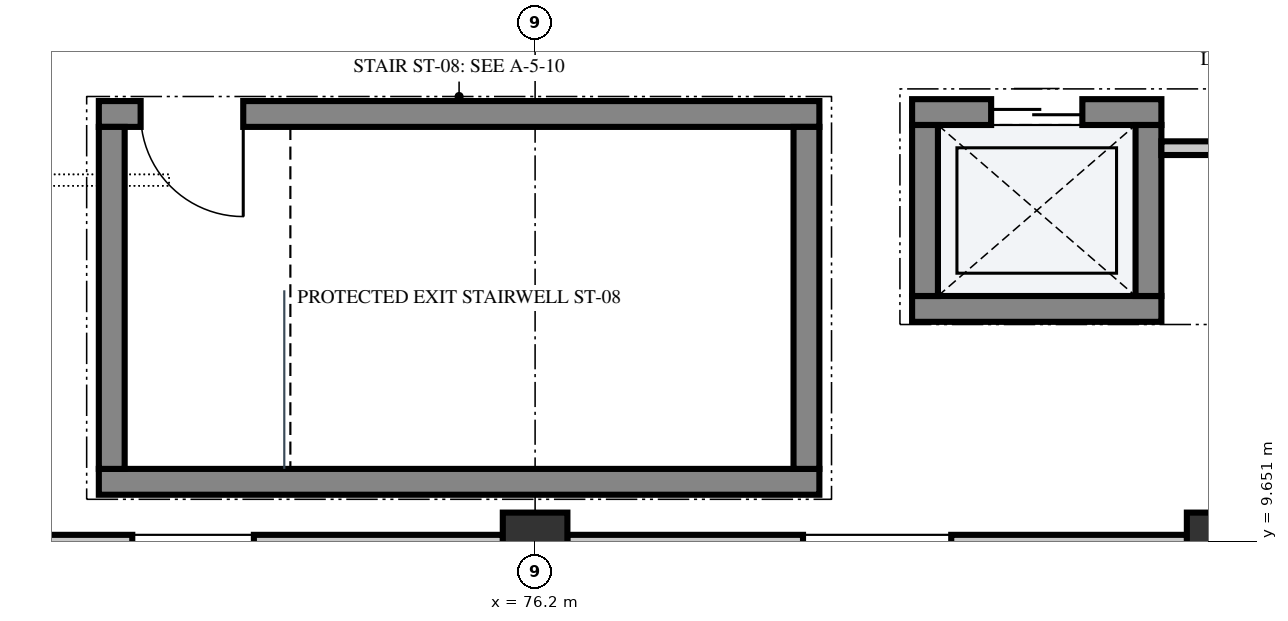
"""IFC4 building model, lengths in metres.
Left out: names, types, materials, properties, quantities, classifications, styles, units other than length and angle.
Written with IfcOpenShell. Run it as: python <this file> out.ifc"""

import sys

from ifc_helpers import new_model, si_unit, direction, frame, frame_2d, origin, origin_2d, place, context, subcontext, project, spatial, rectangle, extrude, element, fill, save


model = new_model("IFC4")
c1 = context("Model", 3, precision=1e-05, world=origin(), true_north=direction((0.0, 1.0)))
c2 = subcontext(c1, "Body", "Model", "MODEL_VIEW")
j1 = project(units=[si_unit("LENGTHUNIT", "METRE"), si_unit("PLANEANGLEUNIT", "RADIAN")], contexts=[c1])
p1 = place(None, origin())
s1 = spatial("IfcSite", under=j1, at=p1, CompositionType="ELEMENT")
p2 = place(p1, origin())
s2 = spatial("IfcBuilding", under=s1, at=p2, CompositionType="ELEMENT")
p3 = place(p2, frame((0.0, 0.0, 15.0)))
s3 = spatial("IfcBuildingStorey", under=s2, at=p3, CompositionType="ELEMENT", Elevation=15.0)
for number, where, z_axis, x_axis in (
    (1, (85.2, 9.6, 0.0), (0.0, 0.0, 1.0), (1.0, 0.0, 0.0)),
    (2, (76.2, 9.6, 0.0), (0.0, 0.0, 1.0), (1.0, 0.0, 0.0)),
):
    element("IfcColumn", number, at=place(p3, frame(where, z_axis=z_axis, x_axis=x_axis)), inside=s3, PredefinedType="COLUMN", context=c2, shape_type="SweptSolid", body=[
        extrude(rectangle(XDim=0.85, YDim=0.85, at=origin_2d()), origin(), (0.0, 0.0, 1.0), 4.8),
    ])
p4 = place(p3, frame((84.777, 9.6, 0.0), z_axis=(0.0, 0.0, 1.0), x_axis=(-1.0, 0.0, 0.0)))
e3 = element("IfcWall", 3, at=p4, inside=s3, PredefinedType="SOLIDWALL", context=c2, shape_type="SweptSolid", body=[
    extrude(rectangle(XDim=8.154, YDim=0.265, at=frame_2d((4.077, 0.0))), origin(), (0.0, 0.0, 1.0), 3.49),
])
p5 = place(p4, frame((3.102, 0.0, 1.1)))
e4 = element("IfcOpeningElement", 4, at=p5, cuts=e3, PredefinedType="OPENING", context=c2, shape_type="SweptSolid", body=[
    extrude(rectangle(XDim=1.95, YDim=1.75, at=frame_2d((0.975, 0.875))), frame((0.0, 0.145, 0.0), z_axis=(0.0, -1.0, 0.0), x_axis=(1.0, 0.0, 0.0)), (0.0, 0.0, 1.0), 0.289),
])
p6 = place(p3, frame((75.777, 9.6, 0.0), z_axis=(0.0, 0.0, 1.0), x_axis=(-1.0, 0.0, 0.0)))
e5 = element("IfcWall", 5, at=p6, inside=s3, PredefinedType="SOLIDWALL", context=c2, shape_type="SweptSolid", body=[
    extrude(rectangle(XDim=8.154, YDim=0.265, at=frame_2d((4.077, 0.0))), origin(), (0.0, 0.0, 1.0), 3.49),
])
p7 = place(p6, frame((3.277, 0.0, 1.1)))
e6 = element("IfcOpeningElement", 6, at=p7, cuts=e5, PredefinedType="OPENING", context=c2, shape_type="SweptSolid", body=[
    extrude(rectangle(XDim=1.6, YDim=1.7, at=frame_2d((0.8, 0.85))), frame((0.0, 0.145, 0.0), z_axis=(0.0, -1.0, 0.0), x_axis=(1.0, 0.0, 0.0)), (0.0, 0.0, 1.0), 0.289),
])
p8 = place(p3, frame((70.46, 10.43, 0.0), z_axis=(0.0, 0.0, 1.0), x_axis=(1.0, 0.0, 0.0)))
e7 = element("IfcWall", 7, at=p8, inside=s3, PredefinedType="SHEAR", context=c2, shape_type="SweptSolid", body=[
    extrude(rectangle(XDim=9.48, YDim=0.34, at=frame_2d((4.74, 0.0))), origin(), (0.0, 0.0, 1.0), 4.52),
])
p9 = place(p3, frame((70.46, 15.27, 0.0), z_axis=(0.0, 0.0, 1.0), x_axis=(1.0, 0.0, 0.0)))
e8 = element("IfcWall", 8, at=p9, inside=s3, PredefinedType="SHEAR", context=c2, shape_type="SweptSolid", body=[
    extrude(rectangle(XDim=9.48, YDim=0.34, at=frame_2d((4.74, 0.0))), origin(), (0.0, 0.0, 1.0), 4.52),
])
p10 = place(p9, frame((0.55, 0.0, 0.0)))
e9 = element("IfcOpeningElement", 9, at=p10, cuts=e8, PredefinedType="OPENING", context=c2, shape_type="SweptSolid", body=[
    extrude(rectangle(XDim=1.35, YDim=2.2, at=frame_2d((0.675, 1.1))), frame((0.0, 0.182, 0.0), z_axis=(0.0, -1.0, 0.0), x_axis=(1.0, 0.0, 0.0)), (0.0, 0.0, 1.0), 0.364),
])
for number, where, z_axis, x_axis in (
    (10, (79.77, 10.6, 0.0), (0.0, 0.0, 1.0), (0.0, 1.0, 0.0)),
    (11, (70.63, 10.6, 0.0), (0.0, 0.0, 1.0), (0.0, 1.0, 0.0)),
):
    element("IfcWall", number, at=place(p3, frame(where, z_axis=z_axis, x_axis=x_axis)), inside=s3, PredefinedType="SHEAR", context=c2, shape_type="SweptSolid", body=[
        extrude(rectangle(XDim=4.5, YDim=0.34, at=frame_2d((2.25, 0.0))), origin(), (0.0, 0.0, 1.0), 4.52),
    ])
p11 = place(p3, frame((81.16, 12.705, 0.0), z_axis=(0.0, 0.0, 1.0), x_axis=(1.0, 0.0, 0.0)))
e12 = element("IfcWall", 12, at=p11, inside=s3, PredefinedType="SHEAR", context=c2, shape_type="SweptSolid", body=[
    extrude(rectangle(XDim=3.28, YDim=0.34, at=frame_2d((1.64, 0.0))), origin(), (0.0, 0.0, 1.0), 4.52),
])
p12 = place(p3, frame((81.16, 15.295, 0.0), z_axis=(0.0, 0.0, 1.0), x_axis=(1.0, 0.0, 0.0)))
e13 = element("IfcWall", 13, at=p12, inside=s3, PredefinedType="SHEAR", context=c2, shape_type="SweptSolid", body=[
    extrude(rectangle(XDim=3.28, YDim=0.34, at=frame_2d((1.64, 0.0))), origin(), (0.0, 0.0, 1.0), 4.52),
])
p13 = place(p12, frame((1.04, 0.0, 0.0)))
e14 = element("IfcOpeningElement", 14, at=p13, cuts=e13, PredefinedType="OPENING", context=c2, shape_type="SweptSolid", body=[
    extrude(rectangle(XDim=1.2, YDim=2.2, at=frame_2d((0.6, 1.1))), frame((0.0, 0.182, 0.0), z_axis=(0.0, -1.0, 0.0), x_axis=(1.0, 0.0, 0.0)), (0.0, 0.0, 1.0), 0.364),
])
for number, where, z_axis, x_axis in (
    (15, (81.33, 12.875, 0.0), (0.0, 0.0, 1.0), (0.0, 1.0, 0.0)),
    (16, (84.27, 12.875, 0.0), (0.0, 0.0, 1.0), (0.0, 1.0, 0.0)),
):
    element("IfcWall", number, at=place(p3, frame(where, z_axis=z_axis, x_axis=x_axis)), inside=s3, PredefinedType="SHEAR", context=c2, shape_type="SweptSolid", body=[
        extrude(rectangle(XDim=2.25, YDim=0.34, at=frame_2d((1.125, 0.0))), origin(), (0.0, 0.0, 1.0), 4.52),
    ])
p14 = place(p3, frame((84.44, 14.82, 0.0), z_axis=(0.0, 0.0, 1.0), x_axis=(1.0, 0.0, 0.0)))
e17 = element("IfcWall", 17, at=p14, inside=s3, PredefinedType="PARTITIONING", context=c2, shape_type="SweptSolid", body=[
    extrude(rectangle(XDim=4.12, YDim=0.18, at=frame_2d((2.06, 0.0))), origin(), (0.0, 0.0, 1.0), 4.52),
])
p15 = place(p10, frame((1.35, 0.0, 0.0), z_axis=(0.0, 0.0, 1.0), x_axis=(-1.0, 0.0, 0.0)))
e18 = element("IfcDoor", 18, at=p15, inside=s3, OperationType="SINGLE_SWING_LEFT", PredefinedType="DOOR", context=c2, shape_type="SweptSolid", body=[
    extrude(rectangle(XDim=1.35, YDim=2.2, at=frame_2d((0.675, 1.1))), frame((0.0, 0.025, 0.0), z_axis=(0.0, -1.0, 0.0), x_axis=(1.0, 0.0, 0.0)), (0.0, 0.0, 1.0), 0.05),
])
fill(e9, e18)
p16 = place(p13, origin())
e19 = element("IfcDoor", 19, at=p16, inside=s3, OperationType="DOUBLE_DOOR_SLIDING", PredefinedType="DOOR", context=c2, shape_type="SweptSolid", body=[
    extrude(rectangle(XDim=1.2, YDim=2.2, at=frame_2d((0.6, 1.1))), frame((0.0, 0.025, 0.0), z_axis=(0.0, -1.0, 0.0), x_axis=(1.0, 0.0, 0.0)), (0.0, 0.0, 1.0), 0.05),
])
fill(e14, e19)
save(model, sys.argv[1])
